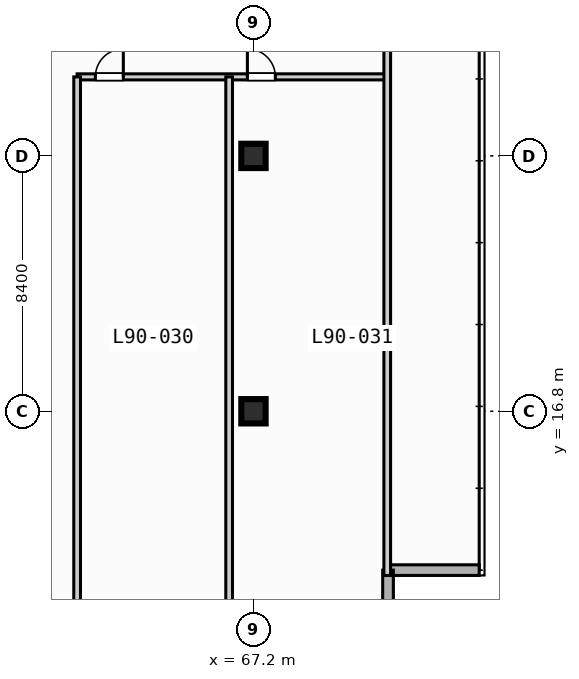
"""IFC4 building model, lengths in metres.
Left out: names, types, materials, properties, quantities, classifications, styles, units other than length and angle.
Written with IfcOpenShell. Run it as: python <this file> out.ifc"""

import sys

from ifc_helpers import new_model, si_unit, direction, frame, frame_2d, origin, origin_2d, place, context, subcontext, project, spatial, rectangle, extrude, element, fill, save


model = new_model("IFC4")
c1 = context("Model", 3, precision=1e-05, world=origin(), true_north=direction((0.0, 1.0)))
c2 = subcontext(c1, "Body", "Model", "MODEL_VIEW")
j1 = project(units=[si_unit("LENGTHUNIT", "METRE"), si_unit("PLANEANGLEUNIT", "RADIAN")], contexts=[c1])
p1 = place(None, origin())
s1 = spatial("IfcSite", under=j1, at=p1, CompositionType="ELEMENT")
p2 = place(p1, origin())
s2 = spatial("IfcBuilding", under=s1, at=p2, CompositionType="ELEMENT")
p3 = place(p2, frame((0.0, 0.0, 363.8)))
s3 = spatial("IfcBuildingStorey", under=s2, at=p3, CompositionType="ELEMENT", Elevation=363.8)
for number, where, z_axis, x_axis in (
    (1, (67.2, 16.8, 0.0), (0.0, 0.0, 1.0), (1.0, 0.0, 0.0)),
    (2, (67.2, 25.2, 0.0), (0.0, 0.0, 1.0), (1.0, 0.0, 0.0)),
):
    element("IfcColumn", number, at=place(p3, frame(where, z_axis=z_axis, x_axis=x_axis)), inside=s3, PredefinedType="COLUMN", context=c2, shape_type="SweptSolid", body=[
        extrude(rectangle(XDim=0.8, YDim=0.8, at=origin_2d()), origin(), (0.0, 0.0, 1.0), 4.8),
    ])
p4 = place(p3, frame((74.625, 11.575, 0.0), z_axis=(0.0, 0.0, 1.0), x_axis=(-1.0, 0.0, 0.0)))
e3 = element("IfcWall", 3, at=p4, inside=s3, PredefinedType="STANDARD", context=c2, shape_type="SweptSolid", body=[
    extrude(rectangle(XDim=3.0, YDim=0.35, at=frame_2d((1.5, 0.0))), origin(), (0.0, 0.0, 1.0), 4.45),
])
p5 = place(p3, frame((71.625, 11.575, 0.0), z_axis=(0.0, 0.0, 1.0), x_axis=(0.0, -1.0, 0.0)))
e4 = element("IfcWall", 4, at=p5, inside=s3, PredefinedType="STANDARD", context=c2, shape_type="SweptSolid", body=[
    extrude(rectangle(XDim=3.0, YDim=0.35, at=frame_2d((1.5, 0.0))), origin(), (0.0, 0.0, 1.0), 3.839),
])
p6 = place(p3, frame((61.4, 27.8, 0.0), z_axis=(0.0, 0.0, 1.0), x_axis=(1.0, 0.0, 0.0)))
e5 = element("IfcWall", 5, at=p6, inside=s3, PredefinedType="PARTITIONING", context=c2, shape_type="SweptSolid", body=[
    extrude(rectangle(XDim=10.2, YDim=0.2, at=frame_2d((5.1, 0.0))), origin(), (0.0, 0.0, 1.0), 4.45),
])
p7 = place(p6, frame((0.6, 0.0, 0.0)))
e6 = element("IfcOpeningElement", 6, at=p7, cuts=e5, PredefinedType="OPENING", context=c2, shape_type="SweptSolid", body=[
    extrude(rectangle(XDim=0.92, YDim=2.1, at=frame_2d((0.46, 1.05))), frame((0.0, 0.11, 0.0), z_axis=(0.0, -1.0, 0.0), x_axis=(1.0, 0.0, 0.0)), (0.0, 0.0, 1.0), 0.22),
])
p8 = place(p6, frame((5.6, 0.0, 0.0)))
e7 = element("IfcOpeningElement", 7, at=p8, cuts=e5, PredefinedType="OPENING", context=c2, shape_type="SweptSolid", body=[
    extrude(rectangle(XDim=0.92, YDim=2.1, at=frame_2d((0.46, 1.05))), frame((0.0, 0.11, 0.0), z_axis=(0.0, -1.0, 0.0), x_axis=(1.0, 0.0, 0.0)), (0.0, 0.0, 1.0), 0.22),
])
p9 = place(p3, frame((61.4, 8.7, 0.0), z_axis=(0.0, 0.0, 1.0), x_axis=(0.0, 1.0, 0.0)))
e8 = element("IfcWall", 8, at=p9, inside=s3, PredefinedType="PARTITIONING", context=c2, shape_type="SweptSolid", body=[
    extrude(rectangle(XDim=19.1, YDim=0.22, at=frame_2d((9.55, 0.0))), origin(), (0.0, 0.0, 1.0), 4.45),
])
p10 = place(p3, frame((71.6, 11.4, 0.0), z_axis=(0.0, 0.0, 1.0), x_axis=(0.0, 1.0, 0.0)))
e9 = element("IfcWall", 9, at=p10, inside=s3, PredefinedType="PARTITIONING", context=c2, shape_type="SweptSolid", body=[
    extrude(rectangle(XDim=19.0, YDim=0.22, at=frame_2d((9.5, 0.0))), origin(), (0.0, 0.0, 1.0), 3.839),
])
p11 = place(p3, frame((66.4, 8.7, 0.0), z_axis=(0.0, 0.0, 1.0), x_axis=(0.0, 1.0, 0.0)))
e10 = element("IfcWall", 10, at=p11, inside=s3, PredefinedType="PARTITIONING", context=c2, shape_type="SweptSolid", body=[
    extrude(rectangle(XDim=19.1, YDim=0.22, at=frame_2d((9.55, 0.0))), origin(), (0.0, 0.0, 1.0), 4.45),
])
p12 = place(p7, origin())
e11 = element("IfcDoor", 11, at=p12, inside=s3, OperationType="SINGLE_SWING_RIGHT", PredefinedType="DOOR", context=c2, shape_type="SweptSolid", body=[
    extrude(rectangle(XDim=0.92, YDim=2.1, at=frame_2d((0.46, 1.05))), frame((0.0, 0.025, 0.0), z_axis=(0.0, -1.0, 0.0), x_axis=(1.0, 0.0, 0.0)), (0.0, 0.0, 1.0), 0.05),
])
fill(e6, e11)
p13 = place(p8, origin())
e12 = element("IfcDoor", 12, at=p13, inside=s3, OperationType="SINGLE_SWING_LEFT", PredefinedType="DOOR", context=c2, shape_type="SweptSolid", body=[
    extrude(rectangle(XDim=0.92, YDim=2.1, at=frame_2d((0.46, 1.05))), frame((0.0, 0.025, 0.0), z_axis=(0.0, -1.0, 0.0), x_axis=(1.0, 0.0, 0.0)), (0.0, 0.0, 1.0), 0.05),
])
fill(e7, e12)
save(model, sys.argv[1])
